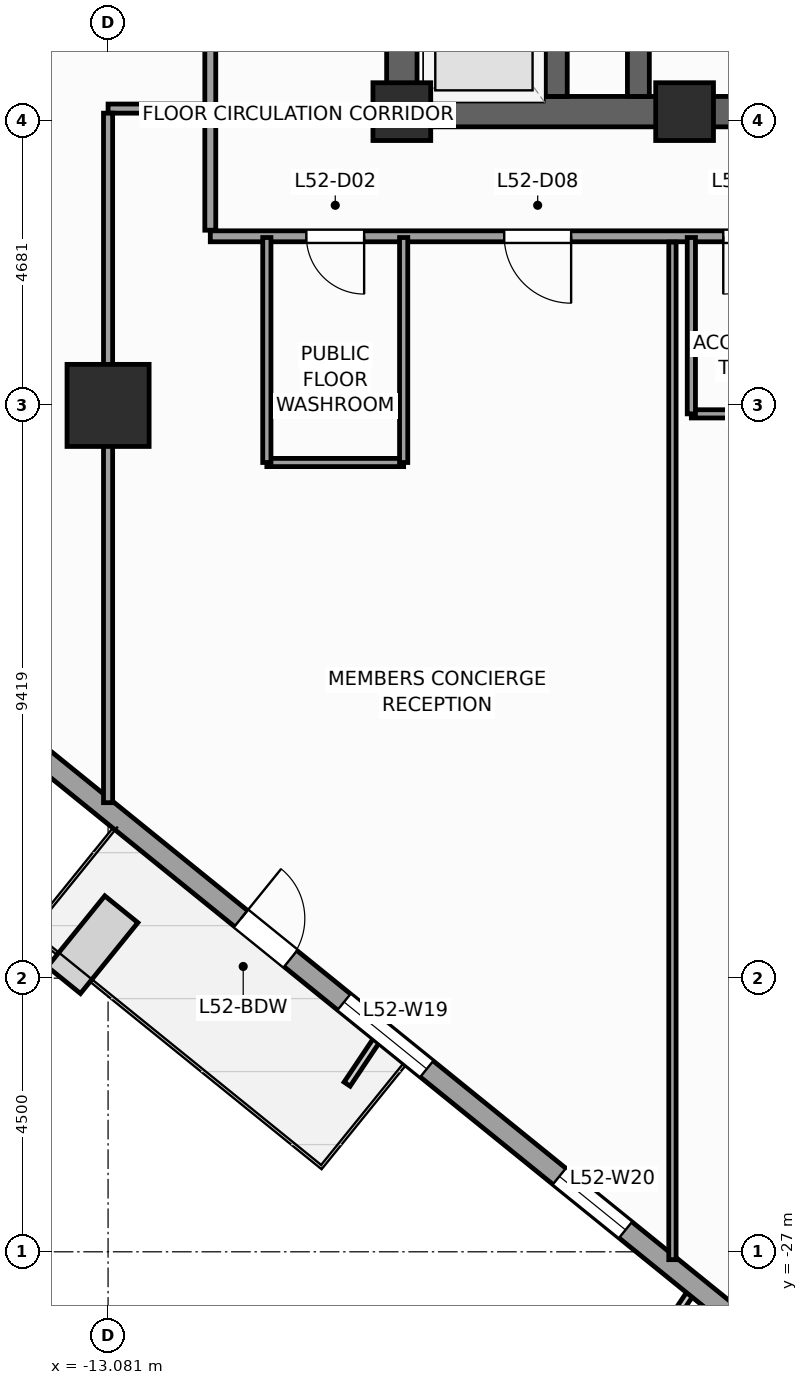
"""IFC4 building model, lengths in metres.
Left out: names, types, materials, properties, quantities, classifications, styles, units other than length and angle.
Written with IfcOpenShell. Run it as: python <this file> out.ifc"""

import sys

from ifc_helpers import new_model, si_unit, direction, frame, frame_2d, origin, origin_2d, place, context, subcontext, project, spatial, rectangle, extrude, source, transform, mapped, element, fill, save


model = new_model("IFC4")
c1 = context("Model", 3, precision=1e-05, world=origin(), true_north=direction((0.0, 1.0)))
c2 = subcontext(c1, "Body", "Model", "MODEL_VIEW")
j1 = project(units=[si_unit("LENGTHUNIT", "METRE"), si_unit("PLANEANGLEUNIT", "RADIAN")], contexts=[c1])
p1 = place(None, origin())
s1 = spatial("IfcSite", under=j1, at=p1, CompositionType="ELEMENT")
p2 = place(p1, origin())
s2 = spatial("IfcBuilding", under=s1, at=p2, CompositionType="ELEMENT")
p3 = place(p2, frame((0.0, 0.0, 217.3)))
s3 = spatial("IfcBuildingStorey", under=s2, at=p3, CompositionType="ELEMENT", Elevation=217.3)
p4 = place(p3, frame((-8.5, -8.25, 0.0), z_axis=(0.0, 0.0, 1.0), x_axis=(1.0, 0.0, 0.0)))
e1 = element("IfcWall", 1, at=p4, inside=s3, PredefinedType="SHEAR", context=c2, shape_type="SweptSolid", body=[
    extrude(rectangle(XDim=17.0, YDim=0.5, at=frame_2d((8.5, 0.0))), origin(), (0.0, 0.0, 1.0), 3.9),
])
p5 = place(p4, frame((7.85, 0.0, 0.0)))
e2 = element("IfcOpeningElement", 2, at=p5, cuts=e1, PredefinedType="OPENING", context=c2, shape_type="SweptSolid", body=[
    extrude(rectangle(XDim=1.3, YDim=2.2, at=frame_2d((0.65, 1.1))), frame((0.0, 0.26, 0.0), z_axis=(0.0, -1.0, 0.0), x_axis=(1.0, 0.0, 0.0)), (0.0, 0.0, 1.0), 0.52),
])
p6 = place(p3, frame((-8.25, -8.0, 0.0), z_axis=(0.0, 0.0, 1.0), x_axis=(0.0, 1.0, 0.0)))
e3 = element("IfcWall", 3, at=p6, inside=s3, PredefinedType="SHEAR", context=c2, shape_type="SweptSolid", body=[
    extrude(rectangle(XDim=16.0, YDim=0.5, at=frame_2d((8.0, 0.0))), origin(), (0.0, 0.0, 1.0), 3.9),
])
p7 = place(p6, frame((4.69, 0.0, 0.0)))
e4 = element("IfcOpeningElement", 4, at=p7, cuts=e3, PredefinedType="OPENING", context=c2, shape_type="SweptSolid", body=[
    extrude(rectangle(XDim=1.3, YDim=2.2, at=frame_2d((0.65, 1.1))), frame((0.0, 0.26, 0.0), z_axis=(0.0, -1.0, 0.0), x_axis=(1.0, 0.0, 0.0)), (0.0, 0.0, 1.0), 0.52),
])
p8 = place(p3, frame((-4.36, -8.0, 0.0), z_axis=(0.0, 0.0, 1.0), x_axis=(0.0, 1.0, 0.0)))
e5 = element("IfcWall", 5, at=p8, inside=s3, PredefinedType="SHEAR", context=c2, shape_type="SweptSolid", body=[
    extrude(rectangle(XDim=16.0, YDim=0.36, at=frame_2d((8.0, 0.0))), origin(), (0.0, 0.0, 1.0), 3.9),
])
p9 = place(p3, frame((-5.71, -8.0, 0.0), z_axis=(0.0, 0.0, 1.0), x_axis=(0.0, 1.0, 0.0)))
e6 = element("IfcWall", 6, at=p9, inside=s3, PredefinedType="SHEAR", context=c2, shape_type="SweptSolid", body=[
    extrude(rectangle(XDim=2.54, YDim=0.36, at=frame_2d((1.27, 0.0))), origin(), (0.0, 0.0, 1.0), 3.9),
])
m1 = source(origin(), c2, "Body", "SweptSolid", [
    extrude(rectangle(XDim=0.95, YDim=0.95, at=origin_2d()), origin(), (0.0, 0.0, 1.0), 3.9),
])
for number, where, z_axis, x_axis in (
    (7, (-8.25, -8.25, 0.0), (0.0, 0.0, 1.0), (1.0, 0.0, 0.0)),
    (8, (-3.6, -8.25, 0.0), (0.0, 0.0, 1.0), (1.0, 0.0, 0.0)),
):
    element("IfcColumn", number, at=place(p3, frame(where, z_axis=z_axis, x_axis=x_axis)), inside=s3, PredefinedType="PILASTER", context=c2, shape_type="MappedRepresentation", body=[
        mapped(m1, transform((0.0, 0.0, 0.0), scale=1.0)),
    ])
m2 = source(origin(), c2, "Body", "SweptSolid", [
    extrude(rectangle(XDim=1.35, YDim=1.35, at=origin_2d()), origin(), (0.0, 0.0, 1.0), 3.9),
])
p10 = place(p3, frame((-13.081, -13.081, 0.0), z_axis=(0.0, 0.0, 1.0), x_axis=(1.0, 0.0, 0.0)))
e9 = element("IfcColumn", 9, at=p10, inside=s3, PredefinedType="COLUMN", context=c2, shape_type="MappedRepresentation", body=[
    mapped(m2, transform((0.0, 0.0, 0.0), scale=1.0)),
])
p11 = place(p3, frame((-29.154, -6.733, 0.0), z_axis=(0.0, 0.0, 1.0), x_axis=(0.77714192302, -0.629325378072, 0.0)))
e10 = element("IfcWall", 10, at=p11, inside=s3, PredefinedType="STANDARD", context=c2, shape_type="SweptSolid", body=[
    extrude(rectangle(XDim=36.84, YDim=0.34, at=frame_2d((18.42, 0.0))), origin(), (0.0, 0.0, 1.0), 2.96),
])
p12 = place(p11, frame((23.495, 0.0, 0.0)))
e11 = element("IfcOpeningElement", 11, at=p12, cuts=e10, PredefinedType="OPENING", context=c2, shape_type="SweptSolid", body=[
    extrude(rectangle(XDim=1.05, YDim=2.25, at=frame_2d((0.525, 1.125))), frame((0.0, 0.18, 0.0), z_axis=(0.0, -1.0, 0.0), x_axis=(1.0, 0.0, 0.0)), (0.0, 0.0, 1.0), 0.36),
])
p13 = place(p11, frame((3.721, 0.0, 0.48)))
e12 = element("IfcOpeningElement", 12, at=p13, cuts=e10, PredefinedType="OPENING", context=c2, shape_type="SweptSolid", body=[
    extrude(rectangle(XDim=1.4, YDim=2.4, at=frame_2d((0.7, 1.2))), frame((0.0, 0.18, 0.0), z_axis=(0.0, -1.0, 0.0), x_axis=(1.0, 0.0, 0.0)), (0.0, 0.0, 1.0), 0.36),
])
p14 = place(p11, frame((9.809, 0.0, 0.58)))
e13 = element("IfcOpeningElement", 13, at=p14, cuts=e10, PredefinedType="OPENING", context=c2, shape_type="SweptSolid", body=[
    extrude(rectangle(XDim=1.75, YDim=2.3, at=frame_2d((0.875, 1.15))), frame((0.0, 0.18, 0.0), z_axis=(0.0, -1.0, 0.0), x_axis=(1.0, 0.0, 0.0)), (0.0, 0.0, 1.0), 0.36),
])
p15 = place(p11, frame((16.058, 0.0, 0.58)))
e14 = element("IfcOpeningElement", 14, at=p15, cuts=e10, PredefinedType="OPENING", context=c2, shape_type="SweptSolid", body=[
    extrude(rectangle(XDim=1.75, YDim=2.3, at=frame_2d((0.875, 1.15))), frame((0.0, 0.18, 0.0), z_axis=(0.0, -1.0, 0.0), x_axis=(1.0, 0.0, 0.0)), (0.0, 0.0, 1.0), 0.36),
])
p16 = place(p11, frame((25.676, 0.0, 0.58)))
e15 = element("IfcOpeningElement", 15, at=p16, cuts=e10, PredefinedType="OPENING", context=c2, shape_type="SweptSolid", body=[
    extrude(rectangle(XDim=1.75, YDim=2.3, at=frame_2d((0.875, 1.15))), frame((0.0, 0.18, 0.0), z_axis=(0.0, -1.0, 0.0), x_axis=(1.0, 0.0, 0.0)), (0.0, 0.0, 1.0), 0.36),
])
p17 = place(p11, frame((30.232, 0.0, 0.48)))
e16 = element("IfcOpeningElement", 16, at=p17, cuts=e10, PredefinedType="OPENING", context=c2, shape_type="SweptSolid", body=[
    extrude(rectangle(XDim=1.4, YDim=2.4, at=frame_2d((0.7, 1.2))), frame((0.0, 0.18, 0.0), z_axis=(0.0, -1.0, 0.0), x_axis=(1.0, 0.0, 0.0)), (0.0, 0.0, 1.0), 0.36),
])
p18 = place(p3, frame((-11.4, -10.3, 0.0), z_axis=(0.0, 0.0, 1.0), x_axis=(1.0, 0.0, 0.0)))
e17 = element("IfcWall", 17, at=p18, inside=s3, PredefinedType="PARTITIONING", context=c2, shape_type="SweptSolid", body=[
    extrude(rectangle(XDim=22.75, YDim=0.18, at=frame_2d((11.375, 0.0))), origin(), (0.0, 0.0, 1.0), 3.66),
])
p19 = place(p18, frame((8.436, 0.0, 0.0)))
e18 = element("IfcOpeningElement", 18, at=p19, cuts=e17, PredefinedType="OPENING", context=c2, shape_type="SweptSolid", body=[
    extrude(rectangle(XDim=0.95, YDim=2.1, at=frame_2d((0.475, 1.05))), frame((0.0, 0.1, 0.0), z_axis=(0.0, -1.0, 0.0), x_axis=(1.0, 0.0, 0.0)), (0.0, 0.0, 1.0), 0.2),
])
p20 = place(p18, frame((1.58, 0.0, 0.0)))
e19 = element("IfcOpeningElement", 19, at=p20, cuts=e17, PredefinedType="OPENING", context=c2, shape_type="SweptSolid", body=[
    extrude(rectangle(XDim=0.95, YDim=2.1, at=frame_2d((0.475, 1.05))), frame((0.0, 0.1, 0.0), z_axis=(0.0, -1.0, 0.0), x_axis=(1.0, 0.0, 0.0)), (0.0, 0.0, 1.0), 0.2),
])
p21 = place(p18, frame((4.834, 0.0, 0.0)))
e20 = element("IfcOpeningElement", 20, at=p21, cuts=e17, PredefinedType="OPENING", context=c2, shape_type="SweptSolid", body=[
    extrude(rectangle(XDim=1.1, YDim=2.2, at=frame_2d((0.55, 1.1))), frame((0.0, 0.1, 0.0), z_axis=(0.0, -1.0, 0.0), x_axis=(1.0, 0.0, 0.0)), (0.0, 0.0, 1.0), 0.2),
])
p22 = place(p18, frame((12.0, 0.0, 0.0)))
e21 = element("IfcOpeningElement", 21, at=p22, cuts=e17, PredefinedType="OPENING", context=c2, shape_type="SweptSolid", body=[
    extrude(rectangle(XDim=1.1, YDim=2.2, at=frame_2d((0.55, 1.1))), frame((0.0, 0.1, 0.0), z_axis=(0.0, -1.0, 0.0), x_axis=(1.0, 0.0, 0.0)), (0.0, 0.0, 1.0), 0.2),
])
p23 = place(p18, frame((18.041, 0.0, 0.0)))
e22 = element("IfcOpeningElement", 22, at=p23, cuts=e17, PredefinedType="OPENING", context=c2, shape_type="SweptSolid", body=[
    extrude(rectangle(XDim=1.1, YDim=2.2, at=frame_2d((0.55, 1.1))), frame((0.0, 0.1, 0.0), z_axis=(0.0, -1.0, 0.0), x_axis=(1.0, 0.0, 0.0)), (0.0, 0.0, 1.0), 0.2),
])
p24 = place(p3, frame((-11.4, -10.2, 0.0), z_axis=(0.0, 0.0, 1.0), x_axis=(0.0, 1.0, 0.0)))
e23 = element("IfcWall", 23, at=p24, inside=s3, PredefinedType="PARTITIONING", context=c2, shape_type="SweptSolid", body=[
    extrude(rectangle(XDim=14.0, YDim=0.18, at=frame_2d((7.0, 0.0))), origin(), (0.0, 0.0, 1.0), 3.66),
])
p25 = place(p24, frame((11.96, 0.0, 0.0)))
e24 = element("IfcOpeningElement", 24, at=p25, cuts=e23, PredefinedType="OPENING", context=c2, shape_type="SweptSolid", body=[
    extrude(rectangle(XDim=1.1, YDim=2.2, at=frame_2d((0.55, 1.1))), frame((0.0, 0.1, 0.0), z_axis=(0.0, -1.0, 0.0), x_axis=(1.0, 0.0, 0.0)), (0.0, 0.0, 1.0), 0.2),
])
p26 = place(p24, frame((9.025, 0.0, 0.0)))
e25 = element("IfcOpeningElement", 25, at=p26, cuts=e23, PredefinedType="OPENING", context=c2, shape_type="SweptSolid", body=[
    extrude(rectangle(XDim=1.1, YDim=2.2, at=frame_2d((0.55, 1.1))), frame((0.0, 0.1, 0.0), z_axis=(0.0, -1.0, 0.0), x_axis=(1.0, 0.0, 0.0)), (0.0, 0.0, 1.0), 0.2),
])
p27 = place(p24, frame((4.35, 0.0, 0.0)))
e26 = element("IfcOpeningElement", 26, at=p27, cuts=e23, PredefinedType="OPENING", context=c2, shape_type="SweptSolid", body=[
    extrude(rectangle(XDim=1.1, YDim=2.2, at=frame_2d((0.55, 1.1))), frame((0.0, 0.1, 0.0), z_axis=(0.0, -1.0, 0.0), x_axis=(1.0, 0.0, 0.0)), (0.0, 0.0, 1.0), 0.2),
])
p28 = place(p3, frame((-11.495, -8.2, 0.0), z_axis=(0.0, 0.0, 1.0), x_axis=(-1.0, 0.0, 0.0)))
e27 = element("IfcWall", 27, at=p28, inside=s3, PredefinedType="PARTITIONING", context=c2, shape_type="SweptSolid", body=[
    extrude(rectangle(XDim=1.586, YDim=0.15, at=frame_2d((0.793, 0.0))), origin(), (0.0, 0.0, 1.0), 3.66),
])
p29 = place(p3, frame((-13.081, -8.275, 0.0), z_axis=(0.0, 0.0, 1.0), x_axis=(0.0, -1.0, 0.0)))
e28 = element("IfcWall", 28, at=p29, inside=s3, PredefinedType="PARTITIONING", context=c2, shape_type="SweptSolid", body=[
    extrude(rectangle(XDim=11.339, YDim=0.15, at=frame_2d((5.669, 0.0))), origin(), (0.0, 0.0, 1.0), 2.76),
])
p30 = place(p3, frame((-3.8, -27.129, 0.0), z_axis=(0.0, 0.0, 1.0), x_axis=(0.0, 1.0, 0.0)))
e29 = element("IfcWall", 29, at=p30, inside=s3, PredefinedType="PARTITIONING", context=c2, shape_type="SweptSolid", body=[
    extrude(rectangle(XDim=16.734, YDim=0.12, at=frame_2d((8.367, 0.0))), origin(), (0.0, 0.0, 1.0), 3.66),
])
p31 = place(p3, frame((-3.489, -13.22, 0.0), z_axis=(0.0, 0.0, 1.0), x_axis=(1.0, 0.0, 0.0)))
e30 = element("IfcWall", 30, at=p31, inside=s3, PredefinedType="PARTITIONING", context=c2, shape_type="SweptSolid", body=[
    extrude(rectangle(XDim=2.0, YDim=0.135, at=frame_2d((1.0, 0.0))), origin(), (0.0, 0.0, 1.0), 2.76),
])
p32 = place(p3, frame((-3.489, -13.22, 0.0), z_axis=(0.0, 0.0, 1.0), x_axis=(0.0, 1.0, 0.0)))
e31 = element("IfcWall", 31, at=p32, inside=s3, PredefinedType="PARTITIONING", context=c2, shape_type="SweptSolid", body=[
    extrude(rectangle(XDim=2.9, YDim=0.135, at=frame_2d((1.45, 0.0))), origin(), (0.0, 0.0, 1.0), 3.66),
])
p33 = place(p3, frame((-10.47, -14.02, 0.0), z_axis=(0.0, 0.0, 1.0), x_axis=(1.0, 0.0, 0.0)))
e32 = element("IfcWall", 32, at=p33, inside=s3, PredefinedType="PARTITIONING", context=c2, shape_type="SweptSolid", body=[
    extrude(rectangle(XDim=2.25, YDim=0.135, at=frame_2d((1.125, 0.0))), origin(), (0.0, 0.0, 1.0), 3.66),
])
for number, where, z_axis, x_axis in (
    (33, (-8.22, -14.02, 0.0), (0.0, 0.0, 1.0), (0.0, 1.0, 0.0)),
    (34, (-10.47, -14.02, 0.0), (0.0, 0.0, 1.0), (0.0, 1.0, 0.0)),
):
    element("IfcWall", number, at=place(p3, frame(where, z_axis=z_axis, x_axis=x_axis)), inside=s3, PredefinedType="PARTITIONING", context=c2, shape_type="SweptSolid", body=[
        extrude(rectangle(XDim=3.7, YDim=0.135, at=frame_2d((1.85, 0.0))), origin(), (0.0, 0.0, 1.0), 3.66),
    ])
m3 = source(origin(), c2, "Body", "SweptSolid", [
    extrude(rectangle(XDim=1.05, YDim=2.25, at=frame_2d((0.525, 1.125))), frame((0.0, 0.025, 0.0), z_axis=(0.0, -1.0, 0.0), x_axis=(1.0, 0.0, 0.0)), (0.0, 0.0, 1.0), 0.05),
])
p34 = place(p12, origin())
e35 = element("IfcDoor", 35, at=p34, inside=s3, OperationType="SINGLE_SWING_LEFT", PredefinedType="DOOR", context=c2, shape_type="MappedRepresentation", body=[
    mapped(m3, transform((0.0, 0.0, 0.0), scale=1.0)),
])
fill(e11, e35)
m4 = source(origin(), c2, "Body", "SweptSolid", [
    extrude(rectangle(XDim=1.75, YDim=2.3, at=frame_2d((0.875, 1.15))), frame((0.0, 0.03, 0.0), z_axis=(0.0, -1.0, 0.0), x_axis=(1.0, 0.0, 0.0)), (0.0, 0.0, 1.0), 0.06),
])
p35 = place(p16, origin())
e36 = element("IfcWindow", 36, at=p35, inside=s3, PartitioningType="SINGLE_PANEL", PredefinedType="WINDOW", context=c2, shape_type="MappedRepresentation", body=[
    mapped(m4, transform((0.0, 0.0, 0.0), scale=1.0)),
])
fill(e15, e36)
m5 = source(origin(), c2, "Body", "SweptSolid", [
    extrude(rectangle(XDim=1.4, YDim=2.4, at=frame_2d((0.7, 1.2))), frame((0.0, 0.03, 0.0), z_axis=(0.0, -1.0, 0.0), x_axis=(1.0, 0.0, 0.0)), (0.0, 0.0, 1.0), 0.06),
])
p36 = place(p17, origin())
e37 = element("IfcWindow", 37, at=p36, inside=s3, PartitioningType="SINGLE_PANEL", PredefinedType="WINDOW", context=c2, shape_type="MappedRepresentation", body=[
    mapped(m5, transform((0.0, 0.0, 0.0), scale=1.0)),
])
fill(e16, e37)
m6 = source(origin(), c2, "Body", "SweptSolid", [
    extrude(rectangle(XDim=0.95, YDim=2.1, at=frame_2d((0.475, 1.05))), frame((0.0, 0.025, 0.0), z_axis=(0.0, -1.0, 0.0), x_axis=(1.0, 0.0, 0.0)), (0.0, 0.0, 1.0), 0.05),
])
p37 = place(p19, frame((0.95, 0.0, 0.0), z_axis=(0.0, 0.0, 1.0), x_axis=(-1.0, 0.0, 0.0)))
e38 = element("IfcDoor", 38, at=p37, inside=s3, OperationType="SINGLE_SWING_LEFT", PredefinedType="DOOR", context=c2, shape_type="MappedRepresentation", body=[
    mapped(m6, transform((0.0, 0.0, 0.0), scale=1.0)),
])
fill(e18, e38)
p38 = place(p20, frame((0.95, 0.0, 0.0), z_axis=(0.0, 0.0, 1.0), x_axis=(-1.0, 0.0, 0.0)))
e39 = element("IfcDoor", 39, at=p38, inside=s3, OperationType="SINGLE_SWING_RIGHT", PredefinedType="DOOR", context=c2, shape_type="MappedRepresentation", body=[
    mapped(m6, transform((0.0, 0.0, 0.0), scale=1.0)),
])
fill(e19, e39)
m7 = source(origin(), c2, "Body", "SweptSolid", [
    extrude(rectangle(XDim=1.1, YDim=2.2, at=frame_2d((0.55, 1.1))), frame((0.0, 0.025, 0.0), z_axis=(0.0, -1.0, 0.0), x_axis=(1.0, 0.0, 0.0)), (0.0, 0.0, 1.0), 0.05),
])
p39 = place(p21, frame((1.1, 0.0, 0.0), z_axis=(0.0, 0.0, 1.0), x_axis=(-1.0, 0.0, 0.0)))
e40 = element("IfcDoor", 40, at=p39, inside=s3, OperationType="SINGLE_SWING_RIGHT", PredefinedType="DOOR", context=c2, shape_type="MappedRepresentation", body=[
    mapped(m7, transform((0.0, 0.0, 0.0), scale=1.0)),
])
fill(e20, e40)
save(model, sys.argv[1])
